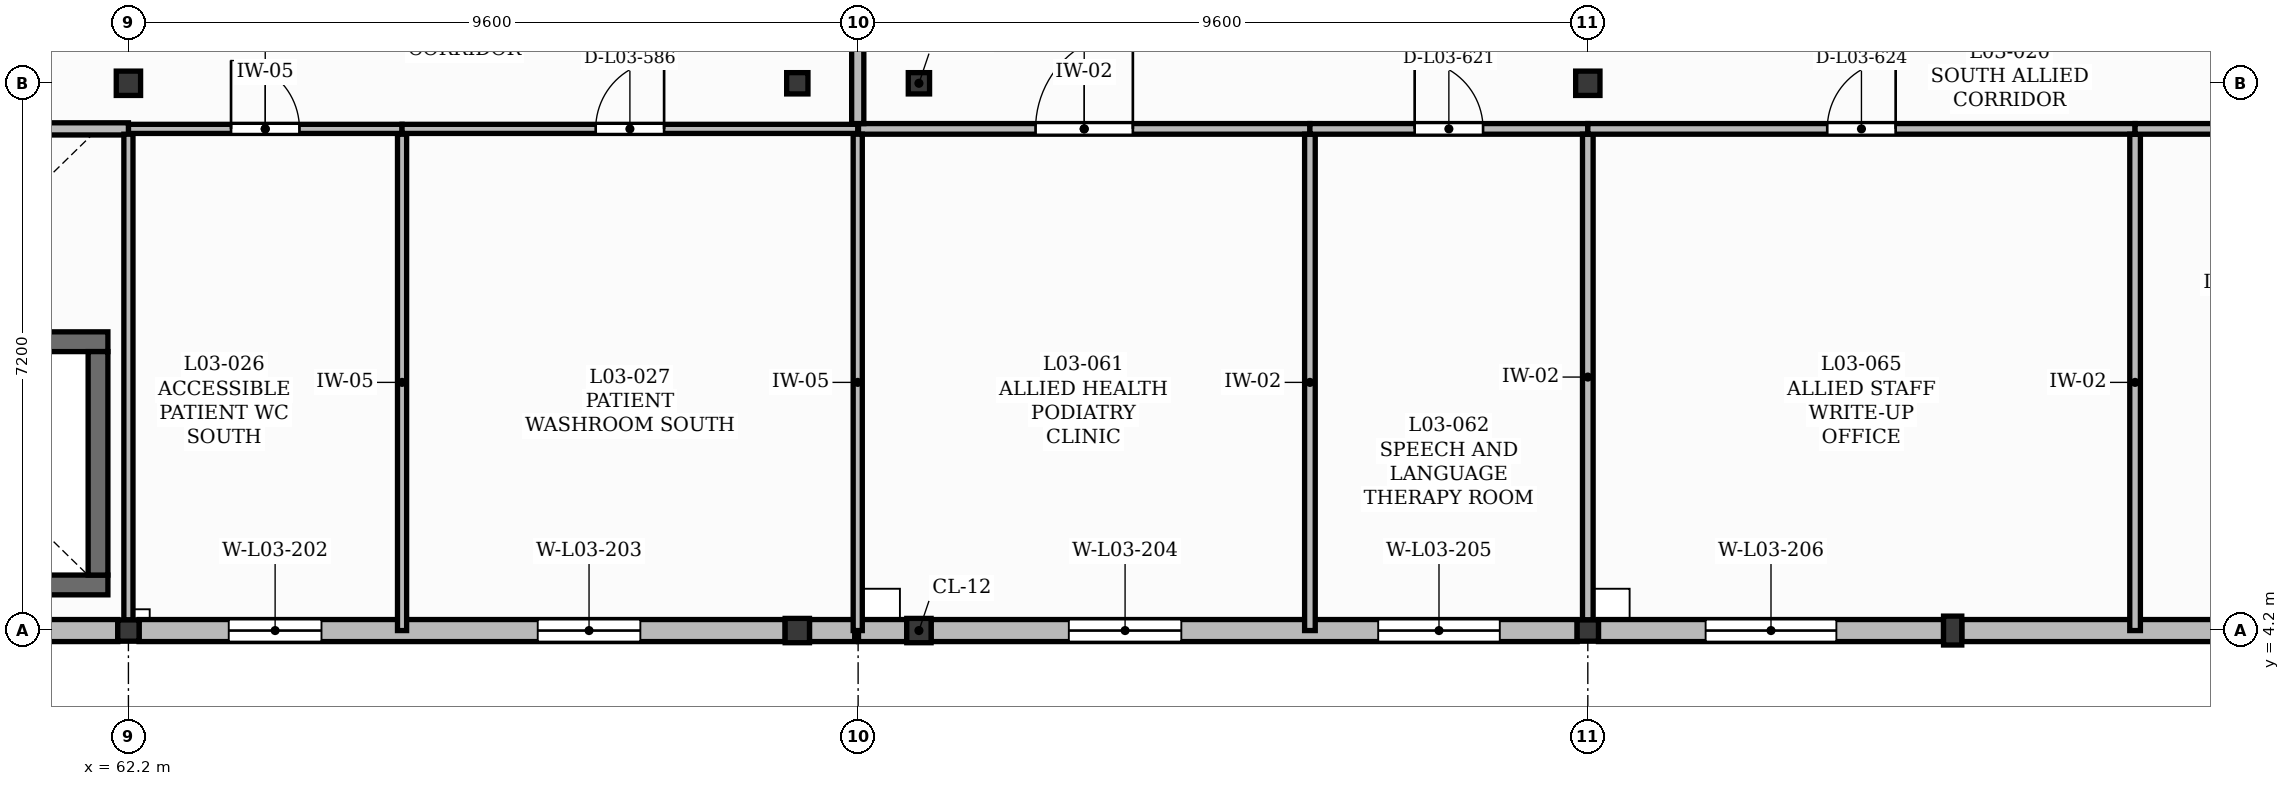
"""IFC4 building model, lengths in metres.
Left out: names, types, materials, properties, quantities, classifications, styles, units other than length and angle.
Written with IfcOpenShell. Run it as: python <this file> out.ifc"""

import sys

from ifc_helpers import new_model, si_unit, direction, frame, frame_2d, origin, origin_2d, place, context, subcontext, project, spatial, rectangle, extrude, element, fill, save


model = new_model("IFC4")
c1 = context("Model", 3, precision=1e-05, world=origin(), true_north=direction((0.0, 1.0)))
c2 = subcontext(c1, "Body", "Model", "MODEL_VIEW")
j1 = project(units=[si_unit("LENGTHUNIT", "METRE"), si_unit("PLANEANGLEUNIT", "RADIAN")], contexts=[c1])
p1 = place(None, origin())
s1 = spatial("IfcSite", under=j1, at=p1, CompositionType="ELEMENT")
p2 = place(p1, origin())
s2 = spatial("IfcBuilding", under=s1, at=p2, CompositionType="ELEMENT")
p3 = place(p2, frame((0.0, 0.0, 13.2)))
s3 = spatial("IfcBuildingStorey", under=s2, at=p3, CompositionType="ELEMENT", Elevation=13.2)
p4 = place(p3, frame((72.6, 4.2, 0.0), z_axis=(0.0, 0.0, 1.0), x_axis=(1.0, 0.0, 0.0)))
e1 = element("IfcColumn", 1, at=p4, inside=s3, PredefinedType="COLUMN", context=c2, shape_type="SweptSolid", body=[
    extrude(rectangle(XDim=0.32, YDim=0.32, at=origin_2d()), origin(), (0.0, 0.0, 1.0), 3.98),
])
p5 = place(p3, frame((72.6, 11.4, 0.0), z_axis=(0.0, 0.0, 1.0), x_axis=(1.0, 0.0, 0.0)))
e2 = element("IfcColumn", 2, at=p5, inside=s3, PredefinedType="COLUMN", context=c2, shape_type="SweptSolid", body=[
    extrude(rectangle(XDim=0.28, YDim=0.28, at=origin_2d()), origin(), (0.0, 0.0, 1.0), 6.045),
])
p6 = place(p3, frame((81.4, 4.2, 0.0), z_axis=(0.0, 0.0, 1.0), x_axis=(1.0, 0.0, 0.0)))
e3 = element("IfcColumn", 3, at=p6, inside=s3, PredefinedType="COLUMN", context=c2, shape_type="SweptSolid", body=[
    extrude(rectangle(XDim=0.28, YDim=0.28, at=origin_2d()), origin(), (0.0, 0.0, 1.0), 3.98),
])
p7 = place(p3, frame((81.4, 11.4, 0.0), z_axis=(0.0, 0.0, 1.0), x_axis=(1.0, 0.0, 0.0)))
e4 = element("IfcColumn", 4, at=p7, inside=s3, PredefinedType="COLUMN", context=c2, shape_type="SweptSolid", body=[
    extrude(rectangle(XDim=0.32, YDim=0.32, at=origin_2d()), origin(), (0.0, 0.0, 1.0), 6.045),
])
p8 = place(p3, frame((62.2, 4.2, 0.0), z_axis=(0.0, 0.0, 1.0), x_axis=(1.0, 0.0, 0.0)))
e5 = element("IfcColumn", 5, at=p8, inside=s3, PredefinedType="COLUMN", context=c2, shape_type="SweptSolid", body=[
    extrude(rectangle(XDim=0.28, YDim=0.28, at=origin_2d()), origin(), (0.0, 0.0, 1.0), 3.98),
])
p9 = place(p3, frame((62.2, 11.4, 0.0), z_axis=(0.0, 0.0, 1.0), x_axis=(1.0, 0.0, 0.0)))
e6 = element("IfcColumn", 6, at=p9, inside=s3, PredefinedType="COLUMN", context=c2, shape_type="SweptSolid", body=[
    extrude(rectangle(XDim=0.32, YDim=0.32, at=origin_2d()), origin(), (0.0, 0.0, 1.0), 6.045),
])
p10 = place(p3, frame((71.0, 4.2, 0.0), z_axis=(0.0, 0.0, 1.0), x_axis=(1.0, 0.0, 0.0)))
e7 = element("IfcColumn", 7, at=p10, inside=s3, PredefinedType="COLUMN", context=c2, shape_type="SweptSolid", body=[
    extrude(rectangle(XDim=0.32, YDim=0.32, at=origin_2d()), origin(), (0.0, 0.0, 1.0), 3.98),
])
p11 = place(p3, frame((71.0, 11.4, 0.0), z_axis=(0.0, 0.0, 1.0), x_axis=(1.0, 0.0, 0.0)))
e8 = element("IfcColumn", 8, at=p11, inside=s3, PredefinedType="COLUMN", context=c2, shape_type="SweptSolid", body=[
    extrude(rectangle(XDim=0.28, YDim=0.28, at=origin_2d()), origin(), (0.0, 0.0, 1.0), 6.045),
])
p12 = place(p3, frame((86.2, 4.2, 0.0), z_axis=(0.0, 0.0, 1.0), x_axis=(1.0, 0.0, 0.0)))
e9 = element("IfcColumn", 9, at=p12, inside=s3, PredefinedType="PILASTER", context=c2, shape_type="SweptSolid", body=[
    extrude(rectangle(XDim=0.24, YDim=0.38, at=origin_2d()), origin(), (0.0, 0.0, 1.0), 4.0),
])
p13 = place(p3, frame((58.72, 4.2, 0.0), z_axis=(0.0, 0.0, 1.0), x_axis=(1.0, 0.0, 0.0)))
e10 = element("IfcWall", 10, at=p13, inside=s3, PredefinedType="SOLIDWALL", context=c2, shape_type="SweptSolid", body=[
    extrude(rectangle(XDim=3.34, YDim=0.29, at=frame_2d((1.67, 0.0))), origin(), (0.0, 0.0, 1.0), 4.0),
])
p14 = place(p3, frame((62.34, 4.2, 0.0), z_axis=(0.0, 0.0, 1.0), x_axis=(1.0, 0.0, 0.0)))
e11 = element("IfcWall", 11, at=p14, inside=s3, PredefinedType="SOLIDWALL", context=c2, shape_type="SweptSolid", body=[
    extrude(rectangle(XDim=8.5, YDim=0.29, at=frame_2d((4.25, 0.0))), origin(), (0.0, 0.0, 1.0), 4.0),
])
p15 = place(p14, frame((1.18, 0.0, 1.0)))
e12 = element("IfcOpeningElement", 12, at=p15, cuts=e11, PredefinedType="OPENING", context=c2, shape_type="SweptSolid", body=[
    extrude(rectangle(XDim=1.22, YDim=2.2, at=frame_2d((0.61, 1.1))), frame((0.0, 0.155, 0.0), z_axis=(0.0, -1.0, 0.0), x_axis=(1.0, 0.0, 0.0)), (0.0, 0.0, 1.0), 0.31),
])
p16 = place(p14, frame((5.245, 0.0, 1.0)))
e13 = element("IfcOpeningElement", 13, at=p16, cuts=e11, PredefinedType="OPENING", context=c2, shape_type="SweptSolid", body=[
    extrude(rectangle(XDim=1.35, YDim=2.2, at=frame_2d((0.675, 1.1))), frame((0.0, 0.155, 0.0), z_axis=(0.0, -1.0, 0.0), x_axis=(1.0, 0.0, 0.0)), (0.0, 0.0, 1.0), 0.31),
])
p17 = place(p3, frame((71.16, 4.2, 0.0), z_axis=(0.0, 0.0, 1.0), x_axis=(1.0, 0.0, 0.0)))
e14 = element("IfcWall", 14, at=p17, inside=s3, PredefinedType="SOLIDWALL", context=c2, shape_type="SweptSolid", body=[
    extrude(rectangle(XDim=0.595, YDim=0.29, at=frame_2d((0.297, 0.0))), origin(), (0.0, 0.0, 1.0), 4.0),
])
p18 = place(p3, frame((71.805, 4.2, 0.0), z_axis=(0.0, 0.0, 1.0), x_axis=(1.0, 0.0, 0.0)))
e15 = element("IfcWall", 15, at=p18, inside=s3, PredefinedType="SOLIDWALL", context=c2, shape_type="SweptSolid", body=[
    extrude(rectangle(XDim=0.635, YDim=0.29, at=frame_2d((0.317, 0.0))), origin(), (0.0, 0.0, 1.0), 4.0),
])
p19 = place(p3, frame((72.76, 4.2, 0.0), z_axis=(0.0, 0.0, 1.0), x_axis=(1.0, 0.0, 0.0)))
e16 = element("IfcWall", 16, at=p19, inside=s3, PredefinedType="SOLIDWALL", context=c2, shape_type="SweptSolid", body=[
    extrude(rectangle(XDim=8.5, YDim=0.29, at=frame_2d((4.25, 0.0))), origin(), (0.0, 0.0, 1.0), 4.0),
])
p20 = place(p19, frame((1.812, 0.0, 1.0)))
e17 = element("IfcOpeningElement", 17, at=p20, cuts=e16, PredefinedType="OPENING", context=c2, shape_type="SweptSolid", body=[
    extrude(rectangle(XDim=1.48, YDim=2.2, at=frame_2d((0.74, 1.1))), frame((0.0, 0.155, 0.0), z_axis=(0.0, -1.0, 0.0), x_axis=(1.0, 0.0, 0.0)), (0.0, 0.0, 1.0), 0.31),
])
p21 = place(p19, frame((5.882, 0.0, 1.0)))
e18 = element("IfcOpeningElement", 18, at=p21, cuts=e16, PredefinedType="OPENING", context=c2, shape_type="SweptSolid", body=[
    extrude(rectangle(XDim=1.6, YDim=2.2, at=frame_2d((0.8, 1.1))), frame((0.0, 0.155, 0.0), z_axis=(0.0, -1.0, 0.0), x_axis=(1.0, 0.0, 0.0)), (0.0, 0.0, 1.0), 0.31),
])
p22 = place(p3, frame((81.54, 4.2, 0.0), z_axis=(0.0, 0.0, 1.0), x_axis=(1.0, 0.0, 0.0)))
e19 = element("IfcWall", 19, at=p22, inside=s3, PredefinedType="SOLIDWALL", context=c2, shape_type="SweptSolid", body=[
    extrude(rectangle(XDim=4.54, YDim=0.29, at=frame_2d((2.27, 0.0))), origin(), (0.0, 0.0, 1.0), 4.0),
])
p23 = place(p22, frame((1.41, 0.0, 1.0)))
e20 = element("IfcOpeningElement", 20, at=p23, cuts=e19, PredefinedType="OPENING", context=c2, shape_type="SweptSolid", body=[
    extrude(rectangle(XDim=1.72, YDim=2.2, at=frame_2d((0.86, 1.1))), frame((0.0, 0.155, 0.0), z_axis=(0.0, -1.0, 0.0), x_axis=(1.0, 0.0, 0.0)), (0.0, 0.0, 1.0), 0.31),
])
p24 = place(p3, frame((86.32, 4.2, 0.0), z_axis=(0.0, 0.0, 1.0), x_axis=(1.0, 0.0, 0.0)))
e21 = element("IfcWall", 21, at=p24, inside=s3, PredefinedType="SOLIDWALL", context=c2, shape_type="SweptSolid", body=[
    extrude(rectangle(XDim=4.52, YDim=0.29, at=frame_2d((2.26, 0.0))), origin(), (0.0, 0.0, 1.0), 4.0),
])
for number, where, z_axis, x_axis in (
    (22, (55.27, 4.8, 0.0), (0.0, 0.0, 1.0), (1.0, 0.0, 0.0)),
    (23, (55.27, 8.0, 0.0), (0.0, 0.0, 1.0), (1.0, 0.0, 0.0)),
):
    element("IfcWall", number, at=place(p3, frame(where, z_axis=z_axis, x_axis=x_axis)), inside=s3, PredefinedType="SHEAR", context=c2, shape_type="SweptSolid", body=[
        extrude(rectangle(XDim=6.66, YDim=0.26, at=frame_2d((3.33, 0.0))), origin(), (0.0, 0.0, 1.0), 3.95),
    ])
p25 = place(p3, frame((61.8, 4.93, 0.0), z_axis=(0.0, 0.0, 1.0), x_axis=(0.0, 1.0, 0.0)))
e24 = element("IfcWall", 24, at=p25, inside=s3, PredefinedType="SHEAR", context=c2, shape_type="SweptSolid", body=[
    extrude(rectangle(XDim=2.94, YDim=0.26, at=frame_2d((1.47, 0.0))), origin(), (0.0, 0.0, 1.0), 3.95),
])
p26 = place(p3, frame((62.2, 10.8, 0.0), z_axis=(0.0, 0.0, 1.0), x_axis=(1.0, 0.0, 0.0)))
e25 = element("IfcWall", 25, at=p26, inside=s3, PredefinedType="PLUMBINGWALL", context=c2, shape_type="SweptSolid", body=[
    extrude(rectangle(XDim=3.6, YDim=0.12, at=frame_2d((1.8, 0.0))), origin(), (0.0, 0.0, 1.0), 3.75),
])
p27 = place(p26, frame((1.35, 0.0, 0.0)))
e26 = element("IfcOpeningElement", 26, at=p27, cuts=e25, PredefinedType="OPENING", context=c2, shape_type="SweptSolid", body=[
    extrude(rectangle(XDim=0.9, YDim=2.1, at=frame_2d((0.45, 1.05))), frame((0.0, 0.07, 0.0), z_axis=(0.0, -1.0, 0.0), x_axis=(1.0, 0.0, 0.0)), (0.0, 0.0, 1.0), 0.14),
])
p28 = place(p3, frame((65.8, 4.2, 0.0), z_axis=(0.0, 0.0, 1.0), x_axis=(0.0, 1.0, 0.0)))
e27 = element("IfcWall", 27, at=p28, inside=s3, PredefinedType="PLUMBINGWALL", context=c2, shape_type="SweptSolid", body=[
    extrude(rectangle(XDim=6.53, YDim=0.12, at=frame_2d((3.265, 0.0))), origin(), (0.0, 0.0, 1.0), 3.75),
])
p29 = place(p3, frame((65.8, 10.8, 0.0), z_axis=(0.0, 0.0, 1.0), x_axis=(1.0, 0.0, 0.0)))
e28 = element("IfcWall", 28, at=p29, inside=s3, PredefinedType="PLUMBINGWALL", context=c2, shape_type="SweptSolid", body=[
    extrude(rectangle(XDim=5.995, YDim=0.12, at=frame_2d((2.998, 0.0))), origin(), (0.0, 0.0, 1.0), 3.75),
])
p30 = place(p29, frame((2.548, 0.0, 0.0)))
e29 = element("IfcOpeningElement", 29, at=p30, cuts=e28, PredefinedType="OPENING", context=c2, shape_type="SweptSolid", body=[
    extrude(rectangle(XDim=0.9, YDim=2.1, at=frame_2d((0.45, 1.05))), frame((0.0, 0.07, 0.0), z_axis=(0.0, -1.0, 0.0), x_axis=(1.0, 0.0, 0.0)), (0.0, 0.0, 1.0), 0.14),
])
p31 = place(p3, frame((71.805, 10.8, 0.0), z_axis=(0.0, 0.0, 1.0), x_axis=(1.0, 0.0, 0.0)))
e30 = element("IfcWall", 30, at=p31, inside=s3, PredefinedType="PARTITIONING", context=c2, shape_type="SweptSolid", body=[
    extrude(rectangle(XDim=5.939, YDim=0.14, at=frame_2d((2.969, 0.0))), origin(), (0.0, 0.0, 1.0), 3.75),
])
p32 = place(p31, frame((2.33, 0.0, 0.0)))
e31 = element("IfcOpeningElement", 31, at=p32, cuts=e30, PredefinedType="OPENING", context=c2, shape_type="SweptSolid", body=[
    extrude(rectangle(XDim=1.28, YDim=2.2, at=frame_2d((0.64, 1.1))), frame((0.0, 0.08, 0.0), z_axis=(0.0, -1.0, 0.0), x_axis=(1.0, 0.0, 0.0)), (0.0, 0.0, 1.0), 0.16),
])
p33 = place(p3, frame((77.744, 4.2, 0.0), z_axis=(0.0, 0.0, 1.0), x_axis=(0.0, 1.0, 0.0)))
e32 = element("IfcWall", 32, at=p33, inside=s3, PredefinedType="PARTITIONING", context=c2, shape_type="SweptSolid", body=[
    extrude(rectangle(XDim=6.53, YDim=0.14, at=frame_2d((3.265, 0.0))), origin(), (0.0, 0.0, 1.0), 3.75),
])
p34 = place(p3, frame((77.744, 10.8, 0.0), z_axis=(0.0, 0.0, 1.0), x_axis=(1.0, 0.0, 0.0)))
e33 = element("IfcWall", 33, at=p34, inside=s3, PredefinedType="PARTITIONING", context=c2, shape_type="SweptSolid", body=[
    extrude(rectangle(XDim=3.656, YDim=0.14, at=frame_2d((1.828, 0.0))), origin(), (0.0, 0.0, 1.0), 3.75),
])
p35 = place(p34, frame((1.378, 0.0, 0.0)))
e34 = element("IfcOpeningElement", 34, at=p35, cuts=e33, PredefinedType="OPENING", context=c2, shape_type="SweptSolid", body=[
    extrude(rectangle(XDim=0.9, YDim=2.1, at=frame_2d((0.45, 1.05))), frame((0.0, 0.08, 0.0), z_axis=(0.0, -1.0, 0.0), x_axis=(1.0, 0.0, 0.0)), (0.0, 0.0, 1.0), 0.16),
])
p36 = place(p3, frame((81.4, 4.34, 0.0), z_axis=(0.0, 0.0, 1.0), x_axis=(0.0, 1.0, 0.0)))
e35 = element("IfcWall", 35, at=p36, inside=s3, PredefinedType="PARTITIONING", context=c2, shape_type="SweptSolid", body=[
    extrude(rectangle(XDim=6.39, YDim=0.14, at=frame_2d((3.195, 0.0))), origin(), (0.0, 0.0, 1.0), 3.75),
])
p37 = place(p3, frame((81.4, 10.8, 0.0), z_axis=(0.0, 0.0, 1.0), x_axis=(1.0, 0.0, 0.0)))
e36 = element("IfcWall", 36, at=p37, inside=s3, PredefinedType="PARTITIONING", context=c2, shape_type="SweptSolid", body=[
    extrude(rectangle(XDim=7.2, YDim=0.14, at=frame_2d((3.6, 0.0))), origin(), (0.0, 0.0, 1.0), 3.75),
])
p38 = place(p37, frame((3.15, 0.0, 0.0)))
e37 = element("IfcOpeningElement", 37, at=p38, cuts=e36, PredefinedType="OPENING", context=c2, shape_type="SweptSolid", body=[
    extrude(rectangle(XDim=0.9, YDim=2.1, at=frame_2d((0.45, 1.05))), frame((0.0, 0.08, 0.0), z_axis=(0.0, -1.0, 0.0), x_axis=(1.0, 0.0, 0.0)), (0.0, 0.0, 1.0), 0.16),
])
p39 = place(p3, frame((88.6, 4.2, 0.0), z_axis=(0.0, 0.0, 1.0), x_axis=(0.0, 1.0, 0.0)))
e38 = element("IfcWall", 38, at=p39, inside=s3, PredefinedType="PARTITIONING", context=c2, shape_type="SweptSolid", body=[
    extrude(rectangle(XDim=6.53, YDim=0.14, at=frame_2d((3.265, 0.0))), origin(), (0.0, 0.0, 1.0), 3.75),
])
p40 = place(p3, frame((88.6, 10.8, 0.0), z_axis=(0.0, 0.0, 1.0), x_axis=(1.0, 0.0, 0.0)))
e39 = element("IfcWall", 39, at=p40, inside=s3, PredefinedType="PARTITIONING", context=c2, shape_type="SweptSolid", body=[
    extrude(rectangle(XDim=3.4, YDim=0.14, at=frame_2d((1.7, 0.0))), origin(), (0.0, 0.0, 1.0), 3.75),
])
p41 = place(p40, frame((1.25, 0.0, 0.0)))
e40 = element("IfcOpeningElement", 40, at=p41, cuts=e39, PredefinedType="OPENING", context=c2, shape_type="SweptSolid", body=[
    extrude(rectangle(XDim=0.9, YDim=2.1, at=frame_2d((0.45, 1.05))), frame((0.0, 0.08, 0.0), z_axis=(0.0, -1.0, 0.0), x_axis=(1.0, 0.0, 0.0)), (0.0, 0.0, 1.0), 0.16),
])
p42 = place(p3, frame((59.4, 10.8, 0.0), z_axis=(0.0, 0.0, 1.0), x_axis=(1.0, 0.0, 0.0)))
e41 = element("IfcWall", 41, at=p42, inside=s3, PredefinedType="PARTITIONING", context=c2, shape_type="SweptSolid", body=[
    extrude(rectangle(XDim=2.8, YDim=0.16, at=frame_2d((1.4, 0.0))), origin(), (0.0, 0.0, 1.0), 3.75),
])
p43 = place(p3, frame((71.795, 10.87, 0.0), z_axis=(0.0, 0.0, 1.0), x_axis=(0.0, 1.0, 0.0)))
e42 = element("IfcWall", 42, at=p43, inside=s3, PredefinedType="PARTITIONING", context=c2, shape_type="SweptSolid", body=[
    extrude(rectangle(XDim=2.46, YDim=0.16, at=frame_2d((1.23, 0.0))), origin(), (0.0, 0.0, 1.0), 3.75),
])
p44 = place(p3, frame((62.2, 4.34, 0.0), z_axis=(0.0, 0.0, 1.0), x_axis=(0.0, 1.0, 0.0)))
e43 = element("IfcWall", 43, at=p44, inside=s3, PredefinedType="PLUMBINGWALL", context=c2, shape_type="SweptSolid", body=[
    extrude(rectangle(XDim=6.39, YDim=0.12, at=frame_2d((3.195, 0.0))), origin(), (0.0, 0.0, 1.0), 3.75),
])
p45 = place(p3, frame((71.795, 4.2, 0.0), z_axis=(0.0, 0.0, 1.0), x_axis=(0.0, 1.0, 0.0)))
e44 = element("IfcWall", 44, at=p45, inside=s3, PredefinedType="PLUMBINGWALL", context=c2, shape_type="SweptSolid", body=[
    extrude(rectangle(XDim=6.53, YDim=0.12, at=frame_2d((3.265, 0.0))), origin(), (0.0, 0.0, 1.0), 3.75),
])
p46 = place(p15, origin())
e45 = element("IfcWindow", 45, at=p46, inside=s3, PartitioningType="SINGLE_PANEL", PredefinedType="WINDOW", context=c2, shape_type="SweptSolid", body=[
    extrude(rectangle(XDim=1.22, YDim=2.2, at=frame_2d((0.61, 1.1))), frame((0.0, 0.03, 0.0), z_axis=(0.0, -1.0, 0.0), x_axis=(1.0, 0.0, 0.0)), (0.0, 0.0, 1.0), 0.06),
])
fill(e12, e45)
p47 = place(p16, origin())
e46 = element("IfcWindow", 46, at=p47, inside=s3, PartitioningType="SINGLE_PANEL", PredefinedType="WINDOW", context=c2, shape_type="SweptSolid", body=[
    extrude(rectangle(XDim=1.35, YDim=2.2, at=frame_2d((0.675, 1.1))), frame((0.0, 0.03, 0.0), z_axis=(0.0, -1.0, 0.0), x_axis=(1.0, 0.0, 0.0)), (0.0, 0.0, 1.0), 0.06),
])
fill(e13, e46)
p48 = place(p20, origin())
e47 = element("IfcWindow", 47, at=p48, inside=s3, PartitioningType="SINGLE_PANEL", PredefinedType="WINDOW", context=c2, shape_type="SweptSolid", body=[
    extrude(rectangle(XDim=1.48, YDim=2.2, at=frame_2d((0.74, 1.1))), frame((0.0, 0.03, 0.0), z_axis=(0.0, -1.0, 0.0), x_axis=(1.0, 0.0, 0.0)), (0.0, 0.0, 1.0), 0.06),
])
fill(e17, e47)
p49 = place(p21, origin())
e48 = element("IfcWindow", 48, at=p49, inside=s3, PartitioningType="DOUBLE_PANEL_VERTICAL", PredefinedType="WINDOW", context=c2, shape_type="SweptSolid", body=[
    extrude(rectangle(XDim=1.6, YDim=2.2, at=frame_2d((0.8, 1.1))), frame((0.0, 0.03, 0.0), z_axis=(0.0, -1.0, 0.0), x_axis=(1.0, 0.0, 0.0)), (0.0, 0.0, 1.0), 0.06),
])
fill(e18, e48)
p50 = place(p23, origin())
e49 = element("IfcWindow", 49, at=p50, inside=s3, PartitioningType="DOUBLE_PANEL_VERTICAL", PredefinedType="WINDOW", context=c2, shape_type="SweptSolid", body=[
    extrude(rectangle(XDim=1.72, YDim=2.2, at=frame_2d((0.86, 1.1))), frame((0.0, 0.03, 0.0), z_axis=(0.0, -1.0, 0.0), x_axis=(1.0, 0.0, 0.0)), (0.0, 0.0, 1.0), 0.06),
])
fill(e20, e49)
p51 = place(p27, origin())
e50 = element("IfcDoor", 50, at=p51, inside=s3, OperationType="SINGLE_SWING_LEFT", PredefinedType="DOOR", context=c2, shape_type="SweptSolid", body=[
    extrude(rectangle(XDim=0.9, YDim=2.1, at=frame_2d((0.45, 1.05))), frame((0.0, 0.025, 0.0), z_axis=(0.0, -1.0, 0.0), x_axis=(1.0, 0.0, 0.0)), (0.0, 0.0, 1.0), 0.05),
])
fill(e26, e50)
p52 = place(p30, origin())
e51 = element("IfcDoor", 51, at=p52, inside=s3, OperationType="SINGLE_SWING_RIGHT", PredefinedType="DOOR", context=c2, shape_type="SweptSolid", body=[
    extrude(rectangle(XDim=0.9, YDim=2.1, at=frame_2d((0.45, 1.05))), frame((0.0, 0.025, 0.0), z_axis=(0.0, -1.0, 0.0), x_axis=(1.0, 0.0, 0.0)), (0.0, 0.0, 1.0), 0.05),
])
fill(e29, e51)
p53 = place(p32, origin())
e52 = element("IfcDoor", 52, at=p53, inside=s3, OperationType="SINGLE_SWING_RIGHT", PredefinedType="DOOR", context=c2, shape_type="SweptSolid", body=[
    extrude(rectangle(XDim=1.28, YDim=2.2, at=frame_2d((0.64, 1.1))), frame((0.0, 0.025, 0.0), z_axis=(0.0, -1.0, 0.0), x_axis=(1.0, 0.0, 0.0)), (0.0, 0.0, 1.0), 0.05),
])
fill(e31, e52)
p54 = place(p35, origin())
e53 = element("IfcDoor", 53, at=p54, inside=s3, OperationType="SINGLE_SWING_LEFT", PredefinedType="DOOR", context=c2, shape_type="SweptSolid", body=[
    extrude(rectangle(XDim=0.9, YDim=2.1, at=frame_2d((0.45, 1.05))), frame((0.0, 0.025, 0.0), z_axis=(0.0, -1.0, 0.0), x_axis=(1.0, 0.0, 0.0)), (0.0, 0.0, 1.0), 0.05),
])
fill(e34, e53)
p55 = place(p38, origin())
e54 = element("IfcDoor", 54, at=p55, inside=s3, OperationType="SINGLE_SWING_RIGHT", PredefinedType="DOOR", context=c2, shape_type="SweptSolid", body=[
    extrude(rectangle(XDim=0.9, YDim=2.1, at=frame_2d((0.45, 1.05))), frame((0.0, 0.025, 0.0), z_axis=(0.0, -1.0, 0.0), x_axis=(1.0, 0.0, 0.0)), (0.0, 0.0, 1.0), 0.05),
])
fill(e37, e54)
save(model, sys.argv[1])
